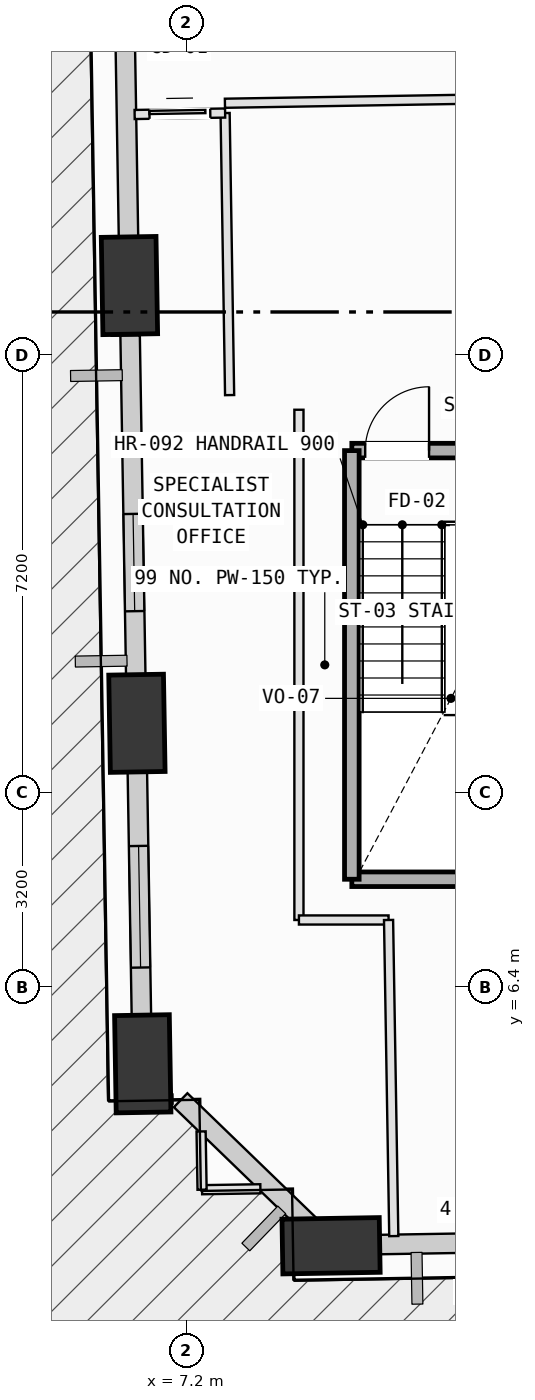
"""IFC4 building model, lengths in metres.
Left out: names, types, materials, properties, quantities, classifications, styles, units other than length and angle.
Written with IfcOpenShell. Run it as: python <this file> out.ifc"""

import sys

from ifc_helpers import new_model, si_unit, direction, frame, frame_2d, origin, origin_2d, place, context, subcontext, project, spatial, rectangle, extrude, element, fill, save


model = new_model("IFC4")
c1 = context("Model", 3, precision=1e-05, world=origin(), true_north=direction((0.0, 1.0)))
c2 = subcontext(c1, "Body", "Model", "MODEL_VIEW")
j1 = project(units=[si_unit("LENGTHUNIT", "METRE"), si_unit("PLANEANGLEUNIT", "RADIAN")], contexts=[c1])
p1 = place(None, origin())
s1 = spatial("IfcSite", under=j1, at=p1, CompositionType="ELEMENT")
p2 = place(p1, origin())
s2 = spatial("IfcBuilding", under=s1, at=p2, CompositionType="ELEMENT")
p3 = place(p2, frame((0.0, 0.0, 27.0)))
s3 = spatial("IfcBuildingStorey", under=s2, at=p3, CompositionType="ELEMENT", Elevation=27.0)
p4 = place(p3, frame((9.578, 2.142, 0.065), z_axis=(0.09385430122, -0.0979135305, 0.990759461569), x_axis=(0.710446471989, 0.703747649097, 0.002248739283)))
e1 = element("IfcColumn", 1, at=p4, inside=s3, PredefinedType="COLUMN", context=c2, shape_type="SweptSolid", body=[
    extrude(rectangle(XDim=1.6, YDim=0.9, at=origin_2d()), origin(), (0.0, 0.0, 1.0), 3.969),
])
p5 = place(p3, frame((6.263, 17.935, 0.096), z_axis=(0.0291455338, -0.112294199523, 0.993247477023), x_axis=(-0.265539861832, 0.957096041308, 0.115998920218)))
e2 = element("IfcColumn", 2, at=p5, inside=s3, PredefinedType="COLUMN", context=c2, shape_type="SweptSolid", body=[
    extrude(rectangle(XDim=1.6, YDim=0.9, at=origin_2d()), origin(), (0.0, 0.0, 1.0), 3.929),
])
p6 = place(p3, frame((6.385, 10.735, 0.104), z_axis=(0.058713450572, -0.111456041764, 0.99203340744), x_axis=(-0.47696440437, 0.869850332471, 0.125957755079)))
e3 = element("IfcColumn", 3, at=p6, inside=s3, PredefinedType="COLUMN", context=c2, shape_type="SweptSolid", body=[
    extrude(rectangle(XDim=1.6, YDim=0.9, at=origin_2d()), origin(), (0.0, 0.0, 1.0), 3.925),
])
p7 = place(p3, frame((6.481, 5.135, 0.114), z_axis=(0.081607948245, -0.110678056429, 0.990500131554), x_axis=(-0.601087417421, 0.787267187995, 0.137492877356)))
e4 = element("IfcColumn", 4, at=p7, inside=s3, PredefinedType="COLUMN", context=c2, shape_type="SweptSolid", body=[
    extrude(rectangle(XDim=1.6, YDim=0.9, at=origin_2d()), origin(), (0.0, 0.0, 1.0), 3.922),
])
p8 = place(p3, frame((16.366, 2.261, 0.0), z_axis=(0.0, 0.0, 1.0), x_axis=(-0.999862417879, -0.016587504707, 0.0)))
e5 = element("IfcWall", 5, at=p8, inside=s3, PredefinedType="SOLIDWALL", context=c2, shape_type="SweptSolid", body=[
    extrude(rectangle(XDim=6.034, YDim=0.32, at=frame_2d((3.017, 0.0))), origin(), (0.0, 0.0, 1.0), 3.165),
])
p9 = place(p8, frame((2.474, 0.0, 0.75)))
e6 = element("IfcOpeningElement", 6, at=p9, cuts=e5, PredefinedType="OPENING", context=c2, shape_type="SweptSolid", body=[
    extrude(rectangle(XDim=2.0, YDim=1.95, at=frame_2d((1.0, 0.975))), frame((0.0, 0.17, 0.0), z_axis=(0.0, -1.0, 0.0), x_axis=(1.0, 0.0, 0.0)), (0.0, 0.0, 1.0), 0.34),
])
p10 = place(p3, frame((6.254, 18.324, 0.0), z_axis=(0.0, 0.0, 1.0), x_axis=(-0.016592528305, 0.999862334526, 0.0)))
e7 = element("IfcWall", 7, at=p10, inside=s3, PredefinedType="SOLIDWALL", context=c2, shape_type="SweptSolid", body=[
    extrude(rectangle(XDim=7.136, YDim=0.32, at=frame_2d((3.568, 0.0))), origin(), (0.0, 0.0, 1.0), 3.165),
])
p11 = place(p10, frame((4.364, 0.0, 0.75)))
e8 = element("IfcOpeningElement", 8, at=p11, cuts=e7, PredefinedType="OPENING", context=c2, shape_type="SweptSolid", body=[
    extrude(rectangle(XDim=1.2, YDim=1.75, at=frame_2d((0.6, 0.875))), frame((0.0, 0.17, 0.0), z_axis=(0.0, -1.0, 0.0), x_axis=(1.0, 0.0, 0.0)), (0.0, 0.0, 1.0), 0.34),
])
p12 = place(p3, frame((6.373, 11.117, 0.0), z_axis=(0.0, 0.0, 1.0), x_axis=(-0.016568711815, 0.999862729473, 0.0)))
e9 = element("IfcWall", 9, at=p12, inside=s3, PredefinedType="SOLIDWALL", context=c2, shape_type="SweptSolid", body=[
    extrude(rectangle(XDim=5.997, YDim=0.32, at=frame_2d((2.999, 0.0))), origin(), (0.0, 0.0, 1.0), 3.165),
])
p13 = place(p12, frame((1.462, 0.0, 0.75)))
e10 = element("IfcOpeningElement", 10, at=p13, cuts=e9, PredefinedType="OPENING", context=c2, shape_type="SweptSolid", body=[
    extrude(rectangle(XDim=1.6, YDim=1.95, at=frame_2d((0.8, 0.975))), frame((0.0, 0.17, 0.0), z_axis=(0.0, -1.0, 0.0), x_axis=(1.0, 0.0, 0.0)), (0.0, 0.0, 1.0), 0.34),
])
p14 = place(p3, frame((6.466, 5.507, 0.0), z_axis=(0.0, 0.0, 1.0), x_axis=(-0.016583300878, 0.999862487611, 0.0)))
e11 = element("IfcWall", 11, at=p14, inside=s3, PredefinedType="SOLIDWALL", context=c2, shape_type="SweptSolid", body=[
    extrude(rectangle(XDim=4.417, YDim=0.32, at=frame_2d((2.208, 0.0))), origin(), (0.0, 0.0, 1.0), 3.165),
])
p15 = place(p14, frame((1.211, 0.0, 0.75)))
e12 = element("IfcOpeningElement", 12, at=p15, cuts=e11, PredefinedType="OPENING", context=c2, shape_type="SweptSolid", body=[
    extrude(rectangle(XDim=2.0, YDim=1.95, at=frame_2d((1.0, 0.975))), frame((0.0, 0.17, 0.0), z_axis=(0.0, -1.0, 0.0), x_axis=(1.0, 0.0, 0.0)), (0.0, 0.0, 1.0), 0.34),
])
p16 = place(p3, frame((9.332, 2.381, 0.0), z_axis=(0.0, 0.0, 1.0), x_axis=(-0.718746893484, 0.695271819584, 0.0)))
e13 = element("IfcWall", 13, at=p16, inside=s3, PredefinedType="SOLIDWALL", context=c2, shape_type="SweptSolid", body=[
    extrude(rectangle(XDim=3.099, YDim=0.32, at=frame_2d((1.55, 0.0))), origin(), (0.0, 0.0, 1.0), 3.165),
])
p17 = place(p3, frame((9.92, 15.22, 0.0), z_axis=(0.0, 0.0, 1.0), x_axis=(1.0, 0.0, 0.0)))
e14 = element("IfcWall", 14, at=p17, inside=s3, PredefinedType="SOLIDWALL", context=c2, shape_type="SweptSolid", body=[
    extrude(rectangle(XDim=3.26, YDim=0.24, at=frame_2d((1.63, 0.0))), origin(), (0.0, 0.0, 1.0), 3.78),
])
p18 = place(p17, frame((0.22, 0.0, 0.0)))
e15 = element("IfcOpeningElement", 15, at=p18, cuts=e14, PredefinedType="OPENING", context=c2, shape_type="SweptSolid", body=[
    extrude(rectangle(XDim=1.05, YDim=2.15, at=frame_2d((0.525, 1.075))), frame((0.0, 0.13, 0.0), z_axis=(0.0, -1.0, 0.0), x_axis=(1.0, 0.0, 0.0)), (0.0, 0.0, 1.0), 0.26),
])
p19 = place(p3, frame((13.18, 8.17, 0.0), z_axis=(0.0, 0.0, 1.0), x_axis=(-1.0, 0.0, 0.0)))
e16 = element("IfcWall", 16, at=p19, inside=s3, PredefinedType="SOLIDWALL", context=c2, shape_type="SweptSolid", body=[
    extrude(rectangle(XDim=3.26, YDim=0.24, at=frame_2d((1.63, 0.0))), origin(), (0.0, 0.0, 1.0), 3.78),
])
p20 = place(p3, frame((9.92, 8.17, 0.0), z_axis=(0.0, 0.0, 1.0), x_axis=(0.0, 1.0, 0.0)))
e17 = element("IfcWall", 17, at=p20, inside=s3, PredefinedType="SOLIDWALL", context=c2, shape_type="SweptSolid", body=[
    extrude(rectangle(XDim=7.05, YDim=0.24, at=frame_2d((3.525, 0.0))), origin(), (0.0, 0.0, 1.0), 3.78),
])
p21 = place(p3, frame((9.05, 15.892, 0.0), z_axis=(0.0, 0.0, 1.0), x_axis=(0.0, -1.0, 0.0)))
e18 = element("IfcWall", 18, at=p21, inside=s3, PredefinedType="PARTITIONING", context=c2, shape_type="SweptSolid", body=[
    extrude(rectangle(XDim=8.392, YDim=0.15, at=frame_2d((4.196, 0.0))), origin(), (0.0, 0.0, 1.0), 3.78),
])
p22 = place(p3, frame((9.05, 7.5, 0.0), z_axis=(0.0, 0.0, 1.0), x_axis=(1.0, 0.0, 0.0)))
e19 = element("IfcWall", 19, at=p22, inside=s3, PredefinedType="PARTITIONING", context=c2, shape_type="SweptSolid", body=[
    extrude(rectangle(XDim=1.474, YDim=0.15, at=frame_2d((0.737, 0.0))), origin(), (0.0, 0.0, 1.0), 3.78),
])
p23 = place(p3, frame((10.524, 7.5, 0.0), z_axis=(0.0, 0.0, 1.0), x_axis=(0.016574384143, -0.999862635461, 0.0)))
e20 = element("IfcWall", 20, at=p23, inside=s3, PredefinedType="PARTITIONING", context=c2, shape_type="SweptSolid", body=[
    extrude(rectangle(XDim=5.2, YDim=0.15, at=frame_2d((2.6, 0.0))), origin(), (0.0, 0.0, 1.0), 3.78),
])
p24 = place(p3, frame((10.336, 1.931, 0.0), z_axis=(0.0, 0.0, 1.0), x_axis=(-0.999869485248, -0.016155880372, 0.0)))
e21 = element("IfcWall", 21, at=p24, inside=s3, PredefinedType="PARTITIONING", context=c2, shape_type="SweptSolid", body=[
    extrude(rectangle(XDim=1.36, YDim=0.15, at=frame_2d((0.68, 0.0))), origin(), (0.0, 0.0, 1.0), 3.165),
])
p25 = place(p3, frame((8.976, 1.909, 0.0), z_axis=(0.0, 0.0, 1.0), x_axis=(-0.015682845326, 0.999877016619, 0.0)))
e22 = element("IfcWall", 22, at=p25, inside=s3, PredefinedType="PARTITIONING", context=c2, shape_type="SweptSolid", body=[
    extrude(rectangle(XDim=0.638, YDim=0.15, at=frame_2d((0.319, 0.0))), origin(), (0.0, 0.0, 1.0), 3.78),
])
p26 = place(p3, frame((8.416, 3.079, 0.0), z_axis=(0.0, 0.0, 1.0), x_axis=(-0.999875454143, -0.015782148207, 0.0)))
e23 = element("IfcWall", 23, at=p26, inside=s3, PredefinedType="PARTITIONING", context=c2, shape_type="SweptSolid", body=[
    extrude(rectangle(XDim=0.959, YDim=0.15, at=frame_2d((0.479, 0.0))), origin(), (0.0, 0.0, 1.0), 3.78),
])
p27 = place(p3, frame((7.457, 3.064, 0.0), z_axis=(0.0, 0.0, 1.0), x_axis=(-0.016817193259, 0.999858581006, 0.0)))
e24 = element("IfcWall", 24, at=p27, inside=s3, PredefinedType="PARTITIONING", context=c2, shape_type="SweptSolid", body=[
    extrude(rectangle(XDim=0.958, YDim=0.15, at=frame_2d((0.479, 0.0))), origin(), (0.0, 0.0, 1.0), 3.78),
])
p28 = place(p3, frame((6.971, 4.555, 0.0), z_axis=(0.0, 0.0, 1.0), x_axis=(-0.99987729837, -0.015664871698, 0.0)))
e25 = element("IfcWall", 25, at=p28, inside=s3, PredefinedType="PARTITIONING", context=c2, shape_type="SweptSolid", body=[
    extrude(rectangle(XDim=0.639, YDim=0.15, at=frame_2d((0.319, 0.0))), origin(), (0.0, 0.0, 1.0), 3.78),
])
p29 = place(p3, frame((6.332, 4.545, 0.0), z_axis=(0.0, 0.0, 1.0), x_axis=(-0.016782986846, 0.999859155758, 0.0)))
e26 = element("IfcWall", 26, at=p29, inside=s3, PredefinedType="PARTITIONING", context=c2, shape_type="SweptSolid", body=[
    extrude(rectangle(XDim=0.96, YDim=0.15, at=frame_2d((0.48, 0.0))), origin(), (0.0, 0.0, 1.0), 3.78),
])
p30 = place(p3, frame((6.243, 9.921, 0.0), z_axis=(0.0, 0.0, 1.0), x_axis=(-0.016763131892, 0.999859488833, 0.0)))
e27 = element("IfcWall", 27, at=p30, inside=s3, PredefinedType="PARTITIONING", context=c2, shape_type="SweptSolid", body=[
    extrude(rectangle(XDim=1.194, YDim=0.15, at=frame_2d((0.597, 0.0))), origin(), (0.0, 0.0, 1.0), 3.165),
])
p31 = place(p3, frame((7.836, 20.772, 0.0), z_axis=(0.0, 0.0, 1.0), x_axis=(0.015944501981, -0.999872878348, 0.0)))
e28 = element("IfcWall", 28, at=p31, inside=s3, PredefinedType="PARTITIONING", context=c2, shape_type="SweptSolid", body=[
    extrude(rectangle(XDim=4.639, YDim=0.15, at=frame_2d((2.32, 0.0))), origin(), (0.0, 0.0, 1.0), 3.78),
])
p32 = place(p3, frame((6.043, 17.11, 0.0), z_axis=(0.0, 0.0, 1.0), x_axis=(-0.01654333702, 0.999863149636, 0.0)))
e29 = element("IfcWall", 29, at=p32, inside=s3, PredefinedType="PARTITIONING", context=c2, shape_type="SweptSolid", body=[
    extrude(rectangle(XDim=1.21, YDim=0.15, at=frame_2d((0.605, 0.0))), origin(), (0.0, 0.0, 1.0), 3.165),
])
p33 = place(p3, frame((6.348, 20.748, 0.0), z_axis=(0.0, 0.0, 1.0), x_axis=(0.999870761908, 0.016076675089, 0.0)))
e30 = element("IfcWall", 30, at=p33, inside=s3, PredefinedType="PARTITIONING", context=c2, shape_type="SweptSolid", body=[
    extrude(rectangle(XDim=1.488, YDim=0.15, at=frame_2d((0.744, 0.0))), origin(), (0.0, 0.0, 1.0), 3.78),
])
p34 = place(p33, frame((0.244, 0.0, 0.0)))
e31 = element("IfcOpeningElement", 31, at=p34, cuts=e30, PredefinedType="OPENING", context=c2, shape_type="SweptSolid", body=[
    extrude(rectangle(XDim=1.0, YDim=2.12, at=frame_2d((0.5, 1.06))), frame((0.0, 0.085, 0.0), z_axis=(0.0, -1.0, 0.0), x_axis=(1.0, 0.0, 0.0)), (0.0, 0.0, 1.0), 0.17),
])
p35 = place(p3, frame((15.759, 21.064, 0.0), z_axis=(0.0, 0.0, 1.0), x_axis=(-0.999863736357, -0.016507838062, 0.0)))
e32 = element("IfcWall", 32, at=p35, inside=s3, PredefinedType="PARTITIONING", context=c2, shape_type="SweptSolid", body=[
    extrude(rectangle(XDim=7.927, YDim=0.15, at=frame_2d((3.963, 0.0))), origin(), (0.0, 0.0, 1.0), 3.78),
])
p36 = place(p13, origin())
e33 = element("IfcWindow", 33, at=p36, inside=s3, PartitioningType="SINGLE_PANEL", PredefinedType="WINDOW", context=c2, shape_type="SweptSolid", body=[
    extrude(rectangle(XDim=1.6, YDim=1.95, at=frame_2d((0.8, 0.975))), frame((0.0, 0.03, 0.0), z_axis=(0.0, -1.0, 0.0), x_axis=(1.0, 0.0, 0.0)), (0.0, 0.0, 1.0), 0.06),
])
fill(e10, e33)
p37 = place(p15, origin())
e34 = element("IfcWindow", 34, at=p37, inside=s3, PartitioningType="SINGLE_PANEL", PredefinedType="WINDOW", context=c2, shape_type="SweptSolid", body=[
    extrude(rectangle(XDim=2.0, YDim=1.95, at=frame_2d((1.0, 0.975))), frame((0.0, 0.03, 0.0), z_axis=(0.0, -1.0, 0.0), x_axis=(1.0, 0.0, 0.0)), (0.0, 0.0, 1.0), 0.06),
])
fill(e12, e34)
p38 = place(p18, origin())
e35 = element("IfcDoor", 35, at=p38, inside=s3, OperationType="SINGLE_SWING_RIGHT", PredefinedType="DOOR", context=c2, shape_type="SweptSolid", body=[
    extrude(rectangle(XDim=1.05, YDim=2.15, at=frame_2d((0.525, 1.075))), frame((0.0, 0.025, 0.0), z_axis=(0.0, -1.0, 0.0), x_axis=(1.0, 0.0, 0.0)), (0.0, 0.0, 1.0), 0.05),
])
fill(e15, e35)
p39 = place(p34, origin())
e36 = element("IfcDoor", 36, at=p39, inside=s3, OperationType="SLIDING_TO_LEFT", PredefinedType="DOOR", context=c2, shape_type="SweptSolid", body=[
    extrude(rectangle(XDim=1.0, YDim=2.12, at=frame_2d((0.5, 1.06))), frame((0.0, 0.025, 0.0), z_axis=(0.0, -1.0, 0.0), x_axis=(1.0, 0.0, 0.0)), (0.0, 0.0, 1.0), 0.05),
])
fill(e31, e36)
save(model, sys.argv[1])
